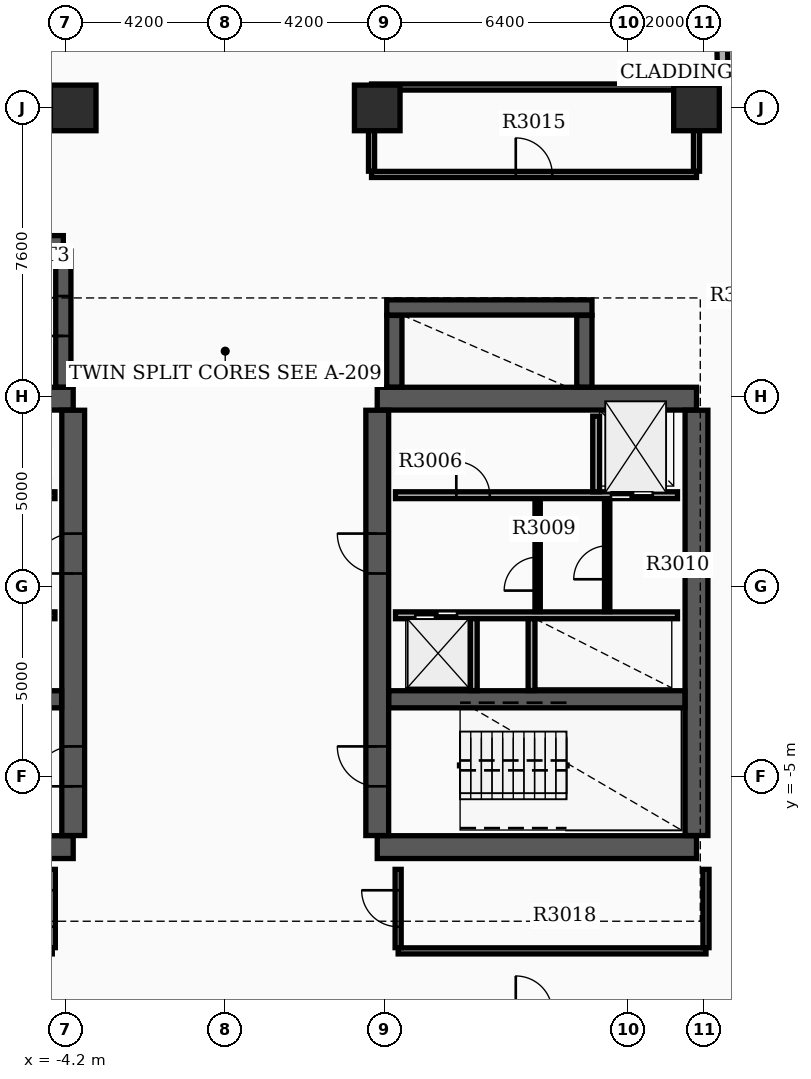
"""IFC4 building model, lengths in metres.
Left out: names, types, materials, properties, quantities, classifications, styles, units other than length and angle.
Written with IfcOpenShell. Run it as: python <this file> out.ifc"""

import sys

from ifc_helpers import new_model, si_unit, direction, frame, frame_2d, origin, origin_2d, place, context, subcontext, project, spatial, rectangle, extrude, element, fill, save


model = new_model("IFC4")
c1 = context("Model", 3, precision=1e-05, world=origin(), true_north=direction((0.0, 1.0)))
c2 = subcontext(c1, "Body", "Model", "MODEL_VIEW")
j1 = project(units=[si_unit("LENGTHUNIT", "METRE"), si_unit("PLANEANGLEUNIT", "RADIAN")], contexts=[c1])
p1 = place(None, origin())
s1 = spatial("IfcSite", under=j1, at=p1, CompositionType="ELEMENT")
p2 = place(p1, origin())
s2 = spatial("IfcBuilding", under=s1, at=p2, CompositionType="ELEMENT")
p3 = place(p2, frame((0.0, 0.0, 187.8)))
s3 = spatial("IfcBuildingStorey", under=s2, at=p3, CompositionType="ELEMENT", Elevation=187.8)
for number, where, z_axis, x_axis in (
    (1, (-12.4, -6.85, 0.0), (0.0, 0.0, 1.0), (1.0, 0.0, 0.0)),
    (2, (-12.4, 4.95, 0.0), (0.0, 0.0, 1.0), (1.0, 0.0, 0.0)),
):
    element("IfcWall", number, at=place(p3, frame(where, z_axis=z_axis, x_axis=x_axis)), inside=s3, PredefinedType="SHEAR", context=c2, shape_type="SweptSolid", body=[
        extrude(rectangle(XDim=8.4, YDim=0.6, at=frame_2d((4.2, 0.0))), origin(), (0.0, 0.0, 1.0), 3.65),
    ])
p4 = place(p3, frame((-4.0, -6.545, 0.0), z_axis=(0.0, 0.0, 1.0), x_axis=(0.0, 1.0, 0.0)))
e3 = element("IfcWall", 3, at=p4, inside=s3, PredefinedType="SHEAR", context=c2, shape_type="SweptSolid", body=[
    extrude(rectangle(XDim=11.19, YDim=0.6, at=frame_2d((5.595, 0.0))), origin(), (0.0, 0.0, 1.0), 3.65),
])
p5 = place(p4, frame((1.295, 0.0, 0.0)))
e4 = element("IfcOpeningElement", 4, at=p5, cuts=e3, PredefinedType="OPENING", context=c2, shape_type="SweptSolid", body=[
    extrude(rectangle(XDim=1.05, YDim=2.15, at=frame_2d((0.525, 1.075))), frame((0.0, 0.31, 0.0), z_axis=(0.0, -1.0, 0.0), x_axis=(1.0, 0.0, 0.0)), (0.0, 0.0, 1.0), 0.62),
])
p6 = place(p4, frame((6.895, 0.0, 0.0)))
e5 = element("IfcOpeningElement", 5, at=p6, cuts=e3, PredefinedType="OPENING", context=c2, shape_type="SweptSolid", body=[
    extrude(rectangle(XDim=1.05, YDim=2.15, at=frame_2d((0.525, 1.075))), frame((0.0, 0.31, 0.0), z_axis=(0.0, -1.0, 0.0), x_axis=(1.0, 0.0, 0.0)), (0.0, 0.0, 1.0), 0.62),
])
p7 = place(p3, frame((-12.095, -2.96, 0.0), z_axis=(0.0, 0.0, 1.0), x_axis=(1.0, 0.0, 0.0)))
e6 = element("IfcWall", 6, at=p7, inside=s3, PredefinedType="SHEAR", context=c2, shape_type="SweptSolid", body=[
    extrude(rectangle(XDim=7.79, YDim=0.45, at=frame_2d((3.895, 0.0))), origin(), (0.0, 0.0, 1.0), 3.65),
])
for number, where, z_axis, x_axis in (
    (7, (4.0, -6.85, 0.0), (0.0, 0.0, 1.0), (1.0, 0.0, 0.0)),
    (8, (4.0, 4.95, 0.0), (0.0, 0.0, 1.0), (1.0, 0.0, 0.0)),
):
    element("IfcWall", number, at=place(p3, frame(where, z_axis=z_axis, x_axis=x_axis)), inside=s3, PredefinedType="SHEAR", context=c2, shape_type="SweptSolid", body=[
        extrude(rectangle(XDim=8.4, YDim=0.6, at=frame_2d((4.2, 0.0))), origin(), (0.0, 0.0, 1.0), 3.65),
    ])
p8 = place(p3, frame((4.0, -6.545, 0.0), z_axis=(0.0, 0.0, 1.0), x_axis=(0.0, 1.0, 0.0)))
e9 = element("IfcWall", 9, at=p8, inside=s3, PredefinedType="SHEAR", context=c2, shape_type="SweptSolid", body=[
    extrude(rectangle(XDim=11.19, YDim=0.6, at=frame_2d((5.595, 0.0))), origin(), (0.0, 0.0, 1.0), 3.65),
])
p9 = place(p8, frame((1.295, 0.0, 0.0)))
e10 = element("IfcOpeningElement", 10, at=p9, cuts=e9, PredefinedType="OPENING", context=c2, shape_type="SweptSolid", body=[
    extrude(rectangle(XDim=1.05, YDim=2.15, at=frame_2d((0.525, 1.075))), frame((0.0, 0.31, 0.0), z_axis=(0.0, -1.0, 0.0), x_axis=(1.0, 0.0, 0.0)), (0.0, 0.0, 1.0), 0.62),
])
p10 = place(p8, frame((6.895, 0.0, 0.0)))
e11 = element("IfcOpeningElement", 11, at=p10, cuts=e9, PredefinedType="OPENING", context=c2, shape_type="SweptSolid", body=[
    extrude(rectangle(XDim=1.05, YDim=2.15, at=frame_2d((0.525, 1.075))), frame((0.0, 0.31, 0.0), z_axis=(0.0, -1.0, 0.0), x_axis=(1.0, 0.0, 0.0)), (0.0, 0.0, 1.0), 0.62),
])
p11 = place(p3, frame((12.4, -6.545, 0.0), z_axis=(0.0, 0.0, 1.0), x_axis=(0.0, 1.0, 0.0)))
e12 = element("IfcWall", 12, at=p11, inside=s3, PredefinedType="SHEAR", context=c2, shape_type="SweptSolid", body=[
    extrude(rectangle(XDim=11.19, YDim=0.6, at=frame_2d((5.595, 0.0))), origin(), (0.0, 0.0, 1.0), 3.65),
])
p12 = place(p3, frame((4.305, -2.96, 0.0), z_axis=(0.0, 0.0, 1.0), x_axis=(1.0, 0.0, 0.0)))
e13 = element("IfcWall", 13, at=p12, inside=s3, PredefinedType="SHEAR", context=c2, shape_type="SweptSolid", body=[
    extrude(rectangle(XDim=7.79, YDim=0.45, at=frame_2d((3.895, 0.0))), origin(), (0.0, 0.0, 1.0), 3.65),
])
p13 = place(p3, frame((-12.22, 9.04, 0.0), z_axis=(0.0, 0.0, 1.0), x_axis=(1.0, 0.0, 0.0)))
e14 = element("IfcWall", 14, at=p13, inside=s3, PredefinedType="SHEAR", context=c2, shape_type="SweptSolid", body=[
    extrude(rectangle(XDim=7.96, YDim=0.4, at=frame_2d((3.98, 0.0))), origin(), (0.0, 0.0, 1.0), 3.65),
])
p14 = place(p3, frame((-4.26, 5.255, 0.0), z_axis=(0.0, 0.0, 1.0), x_axis=(0.0, 1.0, 0.0)))
e15 = element("IfcWall", 15, at=p14, inside=s3, PredefinedType="SHEAR", context=c2, shape_type="SweptSolid", body=[
    extrude(rectangle(XDim=3.58, YDim=0.4, at=frame_2d((1.79, 0.0))), origin(), (0.0, 0.0, 1.0), 3.65),
])
p15 = place(p14, frame((1.345, 0.0, 0.0)))
e16 = element("IfcOpeningElement", 16, at=p15, cuts=e15, PredefinedType="OPENING", context=c2, shape_type="SweptSolid", body=[
    extrude(rectangle(XDim=1.05, YDim=2.15, at=frame_2d((0.525, 1.075))), frame((0.0, 0.21, 0.0), z_axis=(0.0, -1.0, 0.0), x_axis=(1.0, 0.0, 0.0)), (0.0, 0.0, 1.0), 0.42),
])
p16 = place(p3, frame((4.45, 5.255, 0.0), z_axis=(0.0, 0.0, 1.0), x_axis=(0.0, 1.0, 0.0)))
e17 = element("IfcWall", 17, at=p16, inside=s3, PredefinedType="SHEAR", context=c2, shape_type="SweptSolid", body=[
    extrude(rectangle(XDim=1.885, YDim=0.4, at=frame_2d((0.942, 0.0))), origin(), (0.0, 0.0, 1.0), 3.65),
])
p17 = place(p3, frame((4.25, 7.35, 0.0), z_axis=(0.0, 0.0, 1.0), x_axis=(1.0, 0.0, 0.0)))
e18 = element("IfcWall", 18, at=p17, inside=s3, PredefinedType="SHEAR", context=c2, shape_type="SweptSolid", body=[
    extrude(rectangle(XDim=5.4, YDim=0.4, at=frame_2d((2.7, 0.0))), origin(), (0.0, 0.0, 1.0), 3.65),
])
p18 = place(p3, frame((9.45, 5.255, 0.0), z_axis=(0.0, 0.0, 1.0), x_axis=(0.0, 1.0, 0.0)))
e19 = element("IfcWall", 19, at=p18, inside=s3, PredefinedType="SHEAR", context=c2, shape_type="SweptSolid", body=[
    extrude(rectangle(XDim=1.885, YDim=0.4, at=frame_2d((0.942, 0.0))), origin(), (0.0, 0.0, 1.0), 3.65),
])
for number, where, z_axis, x_axis in (
    (20, (12.4, 12.6, 0.0), (0.0, 0.0, 1.0), (1.0, 0.0, 0.0)),
    (21, (4.0, 12.6, 0.0), (0.0, 0.0, 1.0), (1.0, 0.0, 0.0)),
    (22, (-4.0, 12.6, 0.0), (0.0, 0.0, 1.0), (1.0, 0.0, 0.0)),
):
    element("IfcColumn", number, at=place(p3, frame(where, z_axis=z_axis, x_axis=x_axis)), inside=s3, PredefinedType="COLUMN", context=c2, shape_type="SweptSolid", body=[
        extrude(rectangle(XDim=1.2, YDim=1.2, at=origin_2d()), origin(), (0.0, 0.0, 1.0), 3.9),
    ])
p19 = place(p3, frame((14.449, 13.529, 0.0), z_axis=(0.0, 0.0, 1.0), x_axis=(-0.999878147354, -0.015610587569, 0.0)))
e23 = element("IfcWall", 23, at=p19, inside=s3, PredefinedType="STANDARD", context=c2, shape_type="SweptSolid", body=[
    extrude(rectangle(XDim=1.22, YDim=0.28, at=frame_2d((0.61, 0.0))), origin(), (0.0, 0.0, 1.0), 2.92),
])
p20 = place(p3, frame((13.087, 13.647, 0.0), z_axis=(0.0, 0.0, 1.0), x_axis=(-0.015785793208, 0.999875396603, 0.0)))
e24 = element("IfcWall", 24, at=p20, inside=s3, PredefinedType="STANDARD", context=c2, shape_type="SweptSolid", body=[
    extrude(rectangle(XDim=1.5, YDim=0.28, at=frame_2d((0.75, 0.0))), origin(), (0.0, 0.0, 1.0), 2.92),
])
p21 = place(p3, frame((-11.9, 2.41, 0.0), z_axis=(0.0, 0.0, 1.0), x_axis=(1.0, 0.0, 0.0)))
e25 = element("IfcWall", 25, at=p21, inside=s3, PredefinedType="SOLIDWALL", context=c2, shape_type="SweptSolid", body=[
    extrude(rectangle(XDim=7.42, YDim=0.18, at=frame_2d((3.71, 0.0))), origin(), (0.0, 0.0, 1.0), 2.91),
])
p22 = place(p21, frame((0.55, 0.0, 0.0)))
e26 = element("IfcOpeningElement", 26, at=p22, cuts=e25, PredefinedType="OPENING", context=c2, shape_type="SweptSolid", body=[
    extrude(rectangle(XDim=1.1, YDim=2.15, at=frame_2d((0.55, 1.075))), frame((0.0, 0.1, 0.0), z_axis=(0.0, -1.0, 0.0), x_axis=(1.0, 0.0, 0.0)), (0.0, 0.0, 1.0), 0.2),
])
p23 = place(p21, frame((4.9, 0.0, 0.0)))
e27 = element("IfcOpeningElement", 27, at=p23, cuts=e25, PredefinedType="OPENING", context=c2, shape_type="SweptSolid", body=[
    extrude(rectangle(XDim=0.88, YDim=2.1, at=frame_2d((0.44, 1.05))), frame((0.0, 0.1, 0.0), z_axis=(0.0, -1.0, 0.0), x_axis=(1.0, 0.0, 0.0)), (0.0, 0.0, 1.0), 0.2),
])
p24 = place(p3, frame((4.48, 2.41, 0.0), z_axis=(0.0, 0.0, 1.0), x_axis=(1.0, 0.0, 0.0)))
e28 = element("IfcWall", 28, at=p24, inside=s3, PredefinedType="SOLIDWALL", context=c2, shape_type="SweptSolid", body=[
    extrude(rectangle(XDim=7.42, YDim=0.18, at=frame_2d((3.71, 0.0))), origin(), (0.0, 0.0, 1.0), 2.91),
])
p25 = place(p24, frame((5.67, 0.0, 0.0)))
e29 = element("IfcOpeningElement", 29, at=p25, cuts=e28, PredefinedType="OPENING", context=c2, shape_type="SweptSolid", body=[
    extrude(rectangle(XDim=1.1, YDim=2.15, at=frame_2d((0.55, 1.075))), frame((0.0, 0.1, 0.0), z_axis=(0.0, -1.0, 0.0), x_axis=(1.0, 0.0, 0.0)), (0.0, 0.0, 1.0), 0.2),
])
p26 = place(p24, frame((1.6, 0.0, 0.0)))
e30 = element("IfcOpeningElement", 30, at=p26, cuts=e28, PredefinedType="OPENING", context=c2, shape_type="SweptSolid", body=[
    extrude(rectangle(XDim=0.88, YDim=2.1, at=frame_2d((0.44, 1.05))), frame((0.0, 0.1, 0.0), z_axis=(0.0, -1.0, 0.0), x_axis=(1.0, 0.0, 0.0)), (0.0, 0.0, 1.0), 0.2),
])
p27 = place(p3, frame((-11.9, -0.75, 0.0), z_axis=(0.0, 0.0, 1.0), x_axis=(1.0, 0.0, 0.0)))
e31 = element("IfcWall", 31, at=p27, inside=s3, PredefinedType="SOLIDWALL", context=c2, shape_type="SweptSolid", body=[
    extrude(rectangle(XDim=7.42, YDim=0.18, at=frame_2d((3.71, 0.0))), origin(), (0.0, 0.0, 1.0), 2.91),
])
p28 = place(p27, frame((0.45, 0.0, 0.0)))
e32 = element("IfcOpeningElement", 32, at=p28, cuts=e31, PredefinedType="OPENING", context=c2, shape_type="SweptSolid", body=[
    extrude(rectangle(XDim=1.1, YDim=2.15, at=frame_2d((0.55, 1.075))), frame((0.0, 0.1, 0.0), z_axis=(0.0, -1.0, 0.0), x_axis=(1.0, 0.0, 0.0)), (0.0, 0.0, 1.0), 0.2),
])
p29 = place(p27, frame((2.35, 0.0, 0.0)))
e33 = element("IfcOpeningElement", 33, at=p29, cuts=e31, PredefinedType="OPENING", context=c2, shape_type="SweptSolid", body=[
    extrude(rectangle(XDim=1.1, YDim=2.15, at=frame_2d((0.55, 1.075))), frame((0.0, 0.1, 0.0), z_axis=(0.0, -1.0, 0.0), x_axis=(1.0, 0.0, 0.0)), (0.0, 0.0, 1.0), 0.2),
])
p30 = place(p3, frame((4.48, -0.75, 0.0), z_axis=(0.0, 0.0, 1.0), x_axis=(1.0, 0.0, 0.0)))
e34 = element("IfcWall", 34, at=p30, inside=s3, PredefinedType="SOLIDWALL", context=c2, shape_type="SweptSolid", body=[
    extrude(rectangle(XDim=7.42, YDim=0.18, at=frame_2d((3.71, 0.0))), origin(), (0.0, 0.0, 1.0), 2.91),
])
p31 = place(p30, frame((0.52, 0.0, 0.0)))
e35 = element("IfcOpeningElement", 35, at=p31, cuts=e34, PredefinedType="OPENING", context=c2, shape_type="SweptSolid", body=[
    extrude(rectangle(XDim=1.1, YDim=2.15, at=frame_2d((0.55, 1.075))), frame((0.0, 0.1, 0.0), z_axis=(0.0, -1.0, 0.0), x_axis=(1.0, 0.0, 0.0)), (0.0, 0.0, 1.0), 0.2),
])
p32 = place(p3, frame((9.76, 2.5, 0.0), z_axis=(0.0, 0.0, 1.0), x_axis=(0.0, 1.0, 0.0)))
e36 = element("IfcWall", 36, at=p32, inside=s3, PredefinedType="SOLIDWALL", context=c2, shape_type="SweptSolid", body=[
    extrude(rectangle(XDim=1.99, YDim=0.18, at=frame_2d((0.995, 0.0))), origin(), (0.0, 0.0, 1.0), 2.91),
])
for number, where, z_axis, x_axis in (
    (37, (6.54, -2.73, 0.0), (0.0, 0.0, 1.0), (0.0, 1.0, 0.0)),
    (38, (8.06, -2.73, 0.0), (0.0, 0.0, 1.0), (0.0, 1.0, 0.0)),
):
    element("IfcWall", number, at=place(p3, frame(where, z_axis=z_axis, x_axis=x_axis)), inside=s3, PredefinedType="SOLIDWALL", context=c2, shape_type="SweptSolid", body=[
        extrude(rectangle(XDim=1.89, YDim=0.18, at=frame_2d((0.945, 0.0))), origin(), (0.0, 0.0, 1.0), 2.91),
    ])
p33 = place(p3, frame((8.22, -0.65, 0.0), z_axis=(0.0, 0.0, 1.0), x_axis=(0.0, 1.0, 0.0)))
e39 = element("IfcWall", 39, at=p33, inside=s3, PredefinedType="SOLIDWALL", context=c2, shape_type="SweptSolid", body=[
    extrude(rectangle(XDim=2.96, YDim=0.14, at=frame_2d((1.48, 0.0))), origin(), (0.0, 0.0, 1.0), 2.91),
])
p34 = place(p33, frame((0.55, 0.0, 0.0)))
e40 = element("IfcOpeningElement", 40, at=p34, cuts=e39, PredefinedType="OPENING", context=c2, shape_type="SweptSolid", body=[
    extrude(rectangle(XDim=0.88, YDim=2.1, at=frame_2d((0.44, 1.05))), frame((0.0, 0.08, 0.0), z_axis=(0.0, -1.0, 0.0), x_axis=(1.0, 0.0, 0.0)), (0.0, 0.0, 1.0), 0.16),
])
p35 = place(p3, frame((10.05, -0.652, 0.0), z_axis=(0.0, 0.0, 1.0), x_axis=(0.0, 1.0, 0.0)))
e41 = element("IfcWall", 41, at=p35, inside=s3, PredefinedType="PARTITIONING", context=c2, shape_type="SweptSolid", body=[
    extrude(rectangle(XDim=2.962, YDim=0.14, at=frame_2d((1.481, 0.0))), origin(), (0.0, 0.0, 1.0), 2.91),
])
p36 = place(p35, frame((0.85, 0.0, 0.0)))
e42 = element("IfcOpeningElement", 42, at=p36, cuts=e41, PredefinedType="OPENING", context=c2, shape_type="SweptSolid", body=[
    extrude(rectangle(XDim=0.88, YDim=2.1, at=frame_2d((0.44, 1.05))), frame((0.0, 0.08, 0.0), z_axis=(0.0, -1.0, 0.0), x_axis=(1.0, 0.0, 0.0)), (0.0, 0.0, 1.0), 0.16),
])
p37 = place(p3, frame((3.85, 10.85, 0.0), z_axis=(0.0, 0.0, 1.0), x_axis=(1.0, 0.0, 0.0)))
e43 = element("IfcWall", 43, at=p37, inside=s3, PredefinedType="PARTITIONING", context=c2, shape_type="SweptSolid", body=[
    extrude(rectangle(XDim=8.55, YDim=0.16, at=frame_2d((4.275, 0.0))), origin(), (0.0, 0.0, 1.0), 2.91),
])
p38 = place(p37, frame((3.795, 0.0, 0.0)))
e44 = element("IfcOpeningElement", 44, at=p38, cuts=e43, PredefinedType="OPENING", context=c2, shape_type="SweptSolid", body=[
    extrude(rectangle(XDim=0.96, YDim=2.15, at=frame_2d((0.48, 1.075))), frame((0.0, 0.09, 0.0), z_axis=(0.0, -1.0, 0.0), x_axis=(1.0, 0.0, 0.0)), (0.0, 0.0, 1.0), 0.18),
])
p39 = place(p3, frame((3.85, 13.15, 0.0), z_axis=(0.0, 0.0, 1.0), x_axis=(1.0, 0.0, 0.0)))
e45 = element("IfcWall", 45, at=p39, inside=s3, PredefinedType="PARTITIONING", context=c2, shape_type="SweptSolid", body=[
    extrude(rectangle(XDim=8.55, YDim=0.16, at=frame_2d((4.275, 0.0))), origin(), (0.0, 0.0, 1.0), 2.91),
])
for number, where, z_axis, x_axis in (
    (46, (3.85, 10.935, 0.0), (0.0, 0.0, 1.0), (0.0, 1.0, 0.0)),
    (47, (12.4, 10.935, 0.0), (0.0, 0.0, 1.0), (0.0, 1.0, 0.0)),
):
    element("IfcWall", number, at=place(p3, frame(where, z_axis=z_axis, x_axis=x_axis)), inside=s3, PredefinedType="PARTITIONING", context=c2, shape_type="SweptSolid", body=[
        extrude(rectangle(XDim=2.13, YDim=0.16, at=frame_2d((1.065, 0.0))), origin(), (0.0, 0.0, 1.0), 2.91),
    ])
p40 = place(p3, frame((4.55, -9.58, 0.0), z_axis=(0.0, 0.0, 1.0), x_axis=(1.0, 0.0, 0.0)))
e48 = element("IfcWall", 48, at=p40, inside=s3, PredefinedType="PARTITIONING", context=c2, shape_type="SweptSolid", body=[
    extrude(rectangle(XDim=8.1, YDim=0.16, at=frame_2d((4.05, 0.0))), origin(), (0.0, 0.0, 1.0), 2.91),
])
p41 = place(p3, frame((4.55, -9.495, 0.0), z_axis=(0.0, 0.0, 1.0), x_axis=(0.0, 1.0, 0.0)))
e49 = element("IfcWall", 49, at=p41, inside=s3, PredefinedType="PARTITIONING", context=c2, shape_type="SweptSolid", body=[
    extrude(rectangle(XDim=2.06, YDim=0.16, at=frame_2d((1.03, 0.0))), origin(), (0.0, 0.0, 1.0), 2.91),
])
p42 = place(p41, frame((0.55, 0.0, 0.0)))
e50 = element("IfcOpeningElement", 50, at=p42, cuts=e49, PredefinedType="OPENING", context=c2, shape_type="SweptSolid", body=[
    extrude(rectangle(XDim=0.96, YDim=2.15, at=frame_2d((0.48, 1.075))), frame((0.0, 0.09, 0.0), z_axis=(0.0, -1.0, 0.0), x_axis=(1.0, 0.0, 0.0)), (0.0, 0.0, 1.0), 0.18),
])
p43 = place(p3, frame((12.65, -9.495, 0.0), z_axis=(0.0, 0.0, 1.0), x_axis=(0.0, 1.0, 0.0)))
e51 = element("IfcWall", 51, at=p43, inside=s3, PredefinedType="PARTITIONING", context=c2, shape_type="SweptSolid", body=[
    extrude(rectangle(XDim=2.06, YDim=0.16, at=frame_2d((1.03, 0.0))), origin(), (0.0, 0.0, 1.0), 2.91),
])
p44 = place(p3, frame((-4.55, -9.495, 0.0), z_axis=(0.0, 0.0, 1.0), x_axis=(0.0, 1.0, 0.0)))
e52 = element("IfcWall", 52, at=p44, inside=s3, PredefinedType="PARTITIONING", context=c2, shape_type="SweptSolid", body=[
    extrude(rectangle(XDim=2.06, YDim=0.16, at=frame_2d((1.03, 0.0))), origin(), (0.0, 0.0, 1.0), 2.91),
])
p45 = place(p44, frame((0.55, 0.0, 0.0)))
e53 = element("IfcOpeningElement", 53, at=p45, cuts=e52, PredefinedType="OPENING", context=c2, shape_type="SweptSolid", body=[
    extrude(rectangle(XDim=0.96, YDim=2.15, at=frame_2d((0.48, 1.075))), frame((0.0, 0.09, 0.0), z_axis=(0.0, -1.0, 0.0), x_axis=(1.0, 0.0, 0.0)), (0.0, 0.0, 1.0), 0.18),
])
p46 = place(p5, origin())
e54 = element("IfcDoor", 54, at=p46, inside=s3, OperationType="SINGLE_SWING_LEFT", PredefinedType="DOOR", context=c2, shape_type="SweptSolid", body=[
    extrude(rectangle(XDim=1.05, YDim=2.15, at=frame_2d((0.525, 1.075))), frame((0.0, 0.025, 0.0), z_axis=(0.0, -1.0, 0.0), x_axis=(1.0, 0.0, 0.0)), (0.0, 0.0, 1.0), 0.05),
])
fill(e4, e54)
p47 = place(p9, origin())
e55 = element("IfcDoor", 55, at=p47, inside=s3, OperationType="SINGLE_SWING_RIGHT", PredefinedType="DOOR", context=c2, shape_type="SweptSolid", body=[
    extrude(rectangle(XDim=1.05, YDim=2.15, at=frame_2d((0.525, 1.075))), frame((0.0, 0.025, 0.0), z_axis=(0.0, -1.0, 0.0), x_axis=(1.0, 0.0, 0.0)), (0.0, 0.0, 1.0), 0.05),
])
fill(e10, e55)
p48 = place(p6, origin())
e56 = element("IfcDoor", 56, at=p48, inside=s3, OperationType="SINGLE_SWING_LEFT", PredefinedType="DOOR", context=c2, shape_type="SweptSolid", body=[
    extrude(rectangle(XDim=1.05, YDim=2.15, at=frame_2d((0.525, 1.075))), frame((0.0, 0.025, 0.0), z_axis=(0.0, -1.0, 0.0), x_axis=(1.0, 0.0, 0.0)), (0.0, 0.0, 1.0), 0.05),
])
fill(e5, e56)
p49 = place(p10, origin())
e57 = element("IfcDoor", 57, at=p49, inside=s3, OperationType="SINGLE_SWING_RIGHT", PredefinedType="DOOR", context=c2, shape_type="SweptSolid", body=[
    extrude(rectangle(XDim=1.05, YDim=2.15, at=frame_2d((0.525, 1.075))), frame((0.0, 0.025, 0.0), z_axis=(0.0, -1.0, 0.0), x_axis=(1.0, 0.0, 0.0)), (0.0, 0.0, 1.0), 0.05),
])
fill(e11, e57)
p50 = place(p15, origin())
e58 = element("IfcDoor", 58, at=p50, inside=s3, OperationType="SINGLE_SWING_LEFT", PredefinedType="DOOR", context=c2, shape_type="SweptSolid", body=[
    extrude(rectangle(XDim=1.05, YDim=2.15, at=frame_2d((0.525, 1.075))), frame((0.0, 0.025, 0.0), z_axis=(0.0, -1.0, 0.0), x_axis=(1.0, 0.0, 0.0)), (0.0, 0.0, 1.0), 0.05),
])
fill(e16, e58)
p51 = place(p25, origin())
e59 = element("IfcDoor", 59, at=p51, inside=s3, OperationType="DOUBLE_DOOR_SLIDING", PredefinedType="DOOR", context=c2, shape_type="SweptSolid", body=[
    extrude(rectangle(XDim=1.1, YDim=2.15, at=frame_2d((0.55, 1.075))), frame((0.0, 0.025, 0.0), z_axis=(0.0, -1.0, 0.0), x_axis=(1.0, 0.0, 0.0)), (0.0, 0.0, 1.0), 0.05),
])
fill(e29, e59)
p52 = place(p31, origin())
e60 = element("IfcDoor", 60, at=p52, inside=s3, OperationType="DOUBLE_DOOR_SLIDING", PredefinedType="DOOR", context=c2, shape_type="SweptSolid", body=[
    extrude(rectangle(XDim=1.1, YDim=2.15, at=frame_2d((0.55, 1.075))), frame((0.0, 0.025, 0.0), z_axis=(0.0, -1.0, 0.0), x_axis=(1.0, 0.0, 0.0)), (0.0, 0.0, 1.0), 0.05),
])
fill(e35, e60)
p53 = place(p26, origin())
e61 = element("IfcDoor", 61, at=p53, inside=s3, OperationType="SINGLE_SWING_LEFT", PredefinedType="DOOR", context=c2, shape_type="SweptSolid", body=[
    extrude(rectangle(XDim=0.88, YDim=2.1, at=frame_2d((0.44, 1.05))), frame((0.0, 0.025, 0.0), z_axis=(0.0, -1.0, 0.0), x_axis=(1.0, 0.0, 0.0)), (0.0, 0.0, 1.0), 0.05),
])
fill(e30, e61)
p54 = place(p34, origin())
e62 = element("IfcDoor", 62, at=p54, inside=s3, OperationType="SINGLE_SWING_LEFT", PredefinedType="DOOR", context=c2, shape_type="SweptSolid", body=[
    extrude(rectangle(XDim=0.88, YDim=2.1, at=frame_2d((0.44, 1.05))), frame((0.0, 0.025, 0.0), z_axis=(0.0, -1.0, 0.0), x_axis=(1.0, 0.0, 0.0)), (0.0, 0.0, 1.0), 0.05),
])
fill(e40, e62)
p55 = place(p36, origin())
e63 = element("IfcDoor", 63, at=p55, inside=s3, OperationType="SINGLE_SWING_LEFT", PredefinedType="DOOR", context=c2, shape_type="SweptSolid", body=[
    extrude(rectangle(XDim=0.88, YDim=2.1, at=frame_2d((0.44, 1.05))), frame((0.0, 0.025, 0.0), z_axis=(0.0, -1.0, 0.0), x_axis=(1.0, 0.0, 0.0)), (0.0, 0.0, 1.0), 0.05),
])
fill(e42, e63)
p56 = place(p38, origin())
e64 = element("IfcDoor", 64, at=p56, inside=s3, OperationType="SINGLE_SWING_LEFT", PredefinedType="DOOR", context=c2, shape_type="SweptSolid", body=[
    extrude(rectangle(XDim=0.96, YDim=2.15, at=frame_2d((0.48, 1.075))), frame((0.0, 0.025, 0.0), z_axis=(0.0, -1.0, 0.0), x_axis=(1.0, 0.0, 0.0)), (0.0, 0.0, 1.0), 0.05),
])
fill(e44, e64)
p57 = place(p42, origin())
e65 = element("IfcDoor", 65, at=p57, inside=s3, OperationType="SINGLE_SWING_RIGHT", PredefinedType="DOOR", context=c2, shape_type="SweptSolid", body=[
    extrude(rectangle(XDim=0.96, YDim=2.15, at=frame_2d((0.48, 1.075))), frame((0.0, 0.025, 0.0), z_axis=(0.0, -1.0, 0.0), x_axis=(1.0, 0.0, 0.0)), (0.0, 0.0, 1.0), 0.05),
])
fill(e50, e65)
p58 = place(p45, origin())
e66 = element("IfcDoor", 66, at=p58, inside=s3, OperationType="SINGLE_SWING_LEFT", PredefinedType="DOOR", context=c2, shape_type="SweptSolid", body=[
    extrude(rectangle(XDim=0.96, YDim=2.15, at=frame_2d((0.48, 1.075))), frame((0.0, 0.025, 0.0), z_axis=(0.0, -1.0, 0.0), x_axis=(1.0, 0.0, 0.0)), (0.0, 0.0, 1.0), 0.05),
])
fill(e53, e66)
save(model, sys.argv[1])
